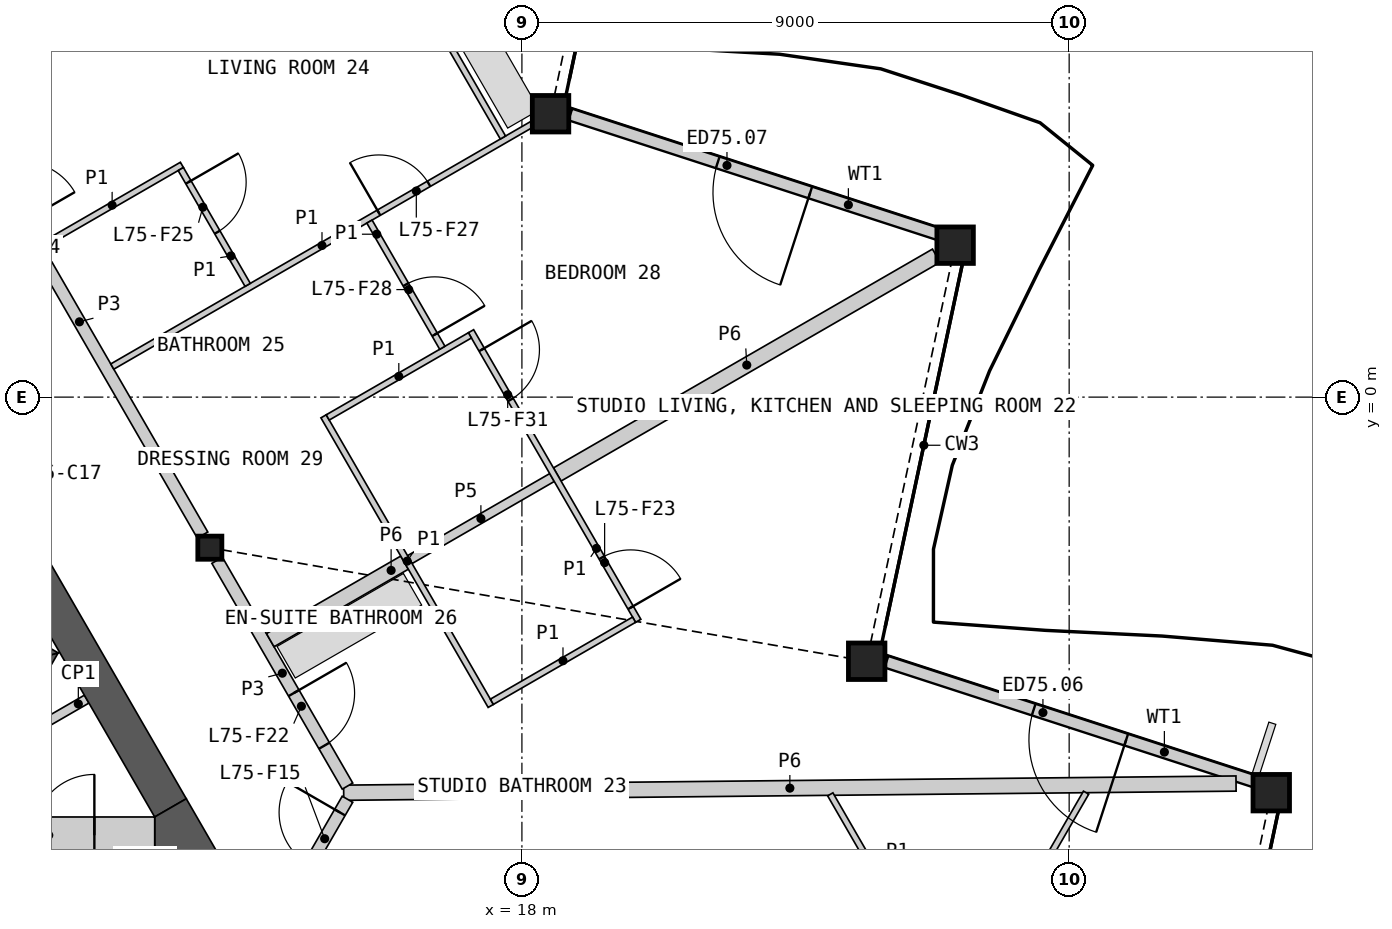
"""IFC4 building model, lengths in metres.
Left out: names, types, materials, properties, quantities, classifications, styles, units other than length and angle.
Written with IfcOpenShell. Run it as: python <this file> out.ifc"""

import sys

from ifc_helpers import new_model, si_unit, direction, frame, frame_2d, origin, origin_2d, place, context, subcontext, project, spatial, polyline, rectangle, hollow_rectangle, i_section, outline, extrude, element, fill, save


model = new_model("IFC4")
c1 = context("Model", 3, precision=1e-05, world=origin(), true_north=direction((0.0, 1.0)))
c2 = subcontext(c1, "Body", "Model", "MODEL_VIEW")
j1 = project(units=[si_unit("LENGTHUNIT", "METRE"), si_unit("PLANEANGLEUNIT", "RADIAN")], contexts=[c1])
p1 = place(None, origin())
s1 = spatial("IfcSite", under=j1, at=p1, CompositionType="ELEMENT")
p2 = place(p1, origin())
s2 = spatial("IfcBuilding", under=s1, at=p2, CompositionType="ELEMENT")
p3 = place(p2, frame((0.0, 0.0, 335.8)))
s3 = spatial("IfcBuildingStorey", under=s2, at=p3, CompositionType="ELEMENT", Elevation=335.8)
for number, where, z_axis, x_axis in (
    (1, (30.324, -6.506, 0.0), (0.0, 0.0, 1.0), (1.0, 0.0, 0.0)),
    (2, (23.67, -4.344, 0.0), (0.0, 0.0, 1.0), (1.0, 0.0, 0.0)),
    (3, (25.125, 2.499, 0.0), (0.0, 0.0, 1.0), (1.0, 0.0, 0.0)),
    (4, (18.471, 4.661, 0.0), (0.0, 0.0, 1.0), (1.0, 0.0, 0.0)),
):
    element("IfcColumn", number, at=place(p3, frame(where, z_axis=z_axis, x_axis=x_axis)), inside=s3, PredefinedType="COLUMN", context=c2, shape_type="SweptSolid", body=[
        extrude(hollow_rectangle(XDim=0.6, YDim=0.6, WallThickness=0.04, at=origin_2d()), origin(), (0.0, 0.0, 1.0), 3.4),
    ])
p4 = place(p3, frame((12.868, -2.476, 0.0), z_axis=(0.0, 0.0, 1.0), x_axis=(1.0, 0.0, 0.0)))
e5 = element("IfcColumn", 5, at=p4, inside=s3, PredefinedType="COLUMN", context=c2, shape_type="SweptSolid", body=[
    extrude(i_section(OverallWidth=0.396, OverallDepth=0.381, WebThickness=0.019, FlangeThickness=0.03, at=origin_2d()), origin(), (0.0, 0.0, 1.0), 3.4),
])
p5 = place(p3, frame((30.09, -6.333, 0.0), z_axis=(0.0, 0.0, 1.0), x_axis=(-0.951048625867, 0.309041277561, 0.0)))
e6 = element("IfcWall", 6, at=p5, inside=s3, PredefinedType="SOLIDWALL", context=c2, shape_type="SweptSolid", body=[
    extrude(rectangle(XDim=6.408, YDim=0.2, at=frame_2d((3.204, 0.0))), origin(), (0.0, 0.0, 1.0), 2.488),
])
p6 = place(p5, frame((2.262, 0.0, 0.0)))
e7 = element("IfcOpeningElement", 7, at=p6, cuts=e6, PredefinedType="OPENING", context=c2, shape_type="SweptSolid", body=[
    extrude(rectangle(XDim=1.6, YDim=2.25, at=frame_2d((0.8, 1.125))), frame((0.0, 0.11, 0.0), z_axis=(0.0, -1.0, 0.0), x_axis=(1.0, 0.0, 0.0)), (0.0, 0.0, 1.0), 0.22),
])
p7 = place(p3, frame((24.893, 2.667, 0.0), z_axis=(0.0, 0.0, 1.0), x_axis=(-0.951058691075, 0.309010301012, 0.0)))
e8 = element("IfcWall", 8, at=p7, inside=s3, PredefinedType="SOLIDWALL", context=c2, shape_type="SweptSolid", body=[
    extrude(rectangle(XDim=6.411, YDim=0.2, at=frame_2d((3.206, 0.0))), origin(), (0.0, 0.0, 1.0), 2.488),
])
p8 = place(p7, frame((2.262, 0.0, 0.0)))
e9 = element("IfcOpeningElement", 9, at=p8, cuts=e8, PredefinedType="OPENING", context=c2, shape_type="SweptSolid", body=[
    extrude(rectangle(XDim=1.6, YDim=2.25, at=frame_2d((0.8, 1.125))), frame((0.0, 0.11, 0.0), z_axis=(0.0, -1.0, 0.0), x_axis=(1.0, 0.0, 0.0)), (0.0, 0.0, 1.0), 0.22),
])
p9 = place(p3, origin())
e10 = element("IfcWall", 10, at=p9, inside=s3, PredefinedType="SHEAR", context=c2, shape_type="SweptSolid", body=[
    extrude(outline(polyline([(8.83, -6.881), (10.374, -4.206), (10.032, -4.298), (8.738, -6.539), (8.83, -6.881)])), origin(), (0.0, 0.0, 1.0), 3.1),
])
p10 = place(p3, origin())
e11 = element("IfcWall", 11, at=p10, inside=s3, PredefinedType="SHEAR", context=c2, shape_type="SweptSolid", body=[
    extrude(outline(polyline([(10.032, -4.298), (10.374, -4.206), (5.307, -1.281), (5.182, -1.498), (10.032, -4.298)])), origin(), (0.0, 0.0, 1.0), 3.1),
])
p11 = place(p3, frame((10.842, -4.967, 0.0), z_axis=(0.0, 0.0, 1.0), x_axis=(-0.866098216386, -0.499873863663, 0.0)))
e12 = element("IfcWall", 12, at=p11, inside=s3, PredefinedType="PARTITIONING", context=c2, shape_type="SweptSolid", body=[
    extrude(rectangle(XDim=1.582, YDim=0.15, at=frame_2d((0.791, 0.0))), origin(), (0.0, 0.0, 1.0), 3.1),
])
p12 = place(p3, frame((12.221, -6.756, 0.0), z_axis=(0.0, 0.0, 1.0), x_axis=(-0.500020646047, 0.866013483456, 0.0)))
e13 = element("IfcWall", 13, at=p12, inside=s3, PredefinedType="SHEAR", context=c2, shape_type="SweptSolid", body=[
    extrude(rectangle(XDim=4.559, YDim=0.6, at=frame_2d((2.28, 0.0))), origin(), (0.0, 0.0, 1.0), 3.1),
])
p13 = place(p3, origin())
e14 = element("IfcWall", 14, at=p13, inside=s3, PredefinedType="SHEAR", context=c2, shape_type="SweptSolid", body=[
    extrude(outline(polyline([(11.961, -7.506), (11.961, -6.906), (12.48, -6.606), (13.0, -7.506), (11.961, -7.506)])), origin(), (0.0, 0.0, 1.0), 3.1),
])
p14 = place(p3, frame((9.369, -7.206, 0.0), z_axis=(0.0, 0.0, 1.0), x_axis=(1.0, 0.0, 0.0)))
e15 = element("IfcWall", 15, at=p14, inside=s3, PredefinedType="SHEAR", context=c2, shape_type="SweptSolid", body=[
    extrude(rectangle(XDim=2.592, YDim=0.6, at=frame_2d((1.296, 0.0))), origin(), (0.0, 0.0, 1.0), 3.1),
])
p15 = place(p14, frame((0.6, 0.0, 0.0)))
e16 = element("IfcOpeningElement", 16, at=p15, cuts=e15, PredefinedType="OPENING", context=c2, shape_type="SweptSolid", body=[
    extrude(rectangle(XDim=1.0, YDim=2.1, at=frame_2d((0.5, 1.05))), frame((0.0, 0.31, 0.0), z_axis=(0.0, -1.0, 0.0), x_axis=(1.0, 0.0, 0.0)), (0.0, 0.0, 1.0), 0.62),
])
p16 = place(p3, frame((15.069, -6.507, 0.0), z_axis=(0.0, 0.0, 1.0), x_axis=(0.999946985532, 0.010296898856, 0.0)))
e17 = element("IfcWall", 17, at=p16, inside=s3, PredefinedType="PARTITIONING", context=c2, shape_type="SweptSolid", body=[
    extrude(rectangle(XDim=14.677, YDim=0.25, at=frame_2d((7.338, 0.0))), origin(), (0.0, 0.0, 1.0), 2.33),
])
p17 = place(p3, frame((8.698, 4.745, 0.0), z_axis=(0.0, 0.0, 1.0), x_axis=(0.499984266882, -0.866034487114, 0.0)))
e18 = element("IfcWall", 18, at=p17, inside=s3, PredefinedType="PARTITIONING", context=c2, shape_type="SweptSolid", body=[
    extrude(rectangle(XDim=8.099, YDim=0.2, at=frame_2d((4.049, 0.0))), origin(), (0.0, 0.0, 1.0), 3.1),
])
p18 = place(p17, frame((1.164, 0.0, 0.0)))
e19 = element("IfcOpeningElement", 19, at=p18, cuts=e18, PredefinedType="OPENING", context=c2, shape_type="SweptSolid", body=[
    extrude(rectangle(XDim=1.0, YDim=2.1, at=frame_2d((0.5, 1.05))), frame((0.0, 0.11, 0.0), z_axis=(0.0, -1.0, 0.0), x_axis=(1.0, 0.0, 0.0)), (0.0, 0.0, 1.0), 0.22),
])
p19 = place(p3, frame((18.581, -1.272, 0.0), z_axis=(0.0, 0.0, 1.0), x_axis=(0.866024038922, 0.500002364004, 0.0)))
e20 = element("IfcWall", 20, at=p19, inside=s3, PredefinedType="PARTITIONING", context=c2, shape_type="SweptSolid", body=[
    extrude(rectangle(XDim=7.198, YDim=0.25, at=frame_2d((3.599, 0.0))), origin(), (0.0, 0.0, 1.0), 2.33),
])
p20 = place(p3, frame((12.988, -2.684, 0.0), z_axis=(0.0, 0.0, 1.0), x_axis=(0.500003406062, -0.866023437285, 0.0)))
e21 = element("IfcWall", 21, at=p20, inside=s3, PredefinedType="PARTITIONING", context=c2, shape_type="SweptSolid", body=[
    extrude(rectangle(XDim=4.288, YDim=0.2, at=frame_2d((2.144, 0.0))), origin(), (0.0, 0.0, 1.0), 3.1),
])
p21 = place(p20, frame((2.521, 0.0, 0.0)))
e22 = element("IfcOpeningElement", 22, at=p21, cuts=e21, PredefinedType="OPENING", context=c2, shape_type="SweptSolid", body=[
    extrude(rectangle(XDim=1.0, YDim=2.1, at=frame_2d((0.5, 1.05))), frame((0.0, 0.11, 0.0), z_axis=(0.0, -1.0, 0.0), x_axis=(1.0, 0.0, 0.0)), (0.0, 0.0, 1.0), 0.22),
])
p22 = place(p3, frame((13.293, -9.797, 0.0), z_axis=(0.0, 0.0, 1.0), x_axis=(0.499967746641, 0.866044024469, 0.0)))
e23 = element("IfcWall", 23, at=p22, inside=s3, PredefinedType="PARTITIONING", context=c2, shape_type="SweptSolid", body=[
    extrude(rectangle(XDim=3.676, YDim=0.2, at=frame_2d((1.838, 0.0))), origin(), (0.0, 0.0, 1.0), 3.1),
])
p23 = place(p22, frame((2.426, 0.0, 0.0)))
e24 = element("IfcOpeningElement", 24, at=p23, cuts=e23, PredefinedType="OPENING", context=c2, shape_type="SweptSolid", body=[
    extrude(rectangle(XDim=1.0, YDim=2.1, at=frame_2d((0.5, 1.05))), frame((0.0, 0.11, 0.0), z_axis=(0.0, -1.0, 0.0), x_axis=(1.0, 0.0, 0.0)), (0.0, 0.0, 1.0), 0.22),
])
p24 = place(p3, frame((13.861, -3.997, 0.0), z_axis=(0.0, 0.0, 1.0), x_axis=(0.866030925526, 0.499990435942, 0.0)))
e25 = element("IfcWall", 25, at=p24, inside=s3, PredefinedType="PARTITIONING", context=c2, shape_type="SweptSolid", body=[
    extrude(rectangle(XDim=2.55, YDim=0.25, at=frame_2d((1.275, 0.0))), origin(), (0.0, 0.0, 1.0), 2.33),
])
p25 = place(p3, frame((16.156, -2.672, 0.0), z_axis=(0.0, 0.0, 1.0), x_axis=(0.866059108428, 0.4999416173, 0.0)))
e26 = element("IfcWall", 26, at=p25, inside=s3, PredefinedType="PLUMBINGWALL", context=c2, shape_type="SweptSolid", body=[
    extrude(rectangle(XDim=2.7, YDim=0.15, at=frame_2d((1.35, 0.0))), origin(), (0.0, 0.0, 1.0), 2.33),
])
p26 = place(p3, frame((8.786, 5.073, 0.0), z_axis=(0.0, 0.0, 1.0), x_axis=(0.86602139559, 0.500006942333, 0.0)))
e27 = element("IfcWall", 27, at=p26, inside=s3, PredefinedType="PARTITIONING", context=c2, shape_type="SweptSolid", body=[
    extrude(rectangle(XDim=12.505, YDim=0.1, at=frame_2d((6.252, 0.0))), origin(), (0.0, 0.0, 1.0), 2.33),
])
p27 = place(p26, frame((5.275, 0.0, 0.0)))
e28 = element("IfcOpeningElement", 28, at=p27, cuts=e27, PredefinedType="OPENING", context=c2, shape_type="SweptSolid", body=[
    extrude(rectangle(XDim=0.95, YDim=2.1, at=frame_2d((0.475, 1.05))), frame((0.0, 0.06, 0.0), z_axis=(0.0, -1.0, 0.0), x_axis=(1.0, 0.0, 0.0)), (0.0, 0.0, 1.0), 0.12),
])
p28 = place(p3, frame((11.263, 0.503, 0.0), z_axis=(0.0, 0.0, 1.0), x_axis=(0.866023773276, 0.500002824113, 0.0)))
e29 = element("IfcWall", 29, at=p28, inside=s3, PredefinedType="PARTITIONING", context=c2, shape_type="SweptSolid", body=[
    extrude(rectangle(XDim=7.965, YDim=0.1, at=frame_2d((3.982, 0.0))), origin(), (0.0, 0.0, 1.0), 2.33),
])
p29 = place(p28, frame((5.061, 0.0, 0.0)))
e30 = element("IfcOpeningElement", 30, at=p29, cuts=e29, PredefinedType="OPENING", context=c2, shape_type="SweptSolid", body=[
    extrude(rectangle(XDim=0.95, YDim=2.1, at=frame_2d((0.475, 1.05))), frame((0.0, 0.06, 0.0), z_axis=(0.0, -1.0, 0.0), x_axis=(1.0, 0.0, 0.0)), (0.0, 0.0, 1.0), 0.12),
])
p30 = place(p3, frame((23.301, -13.395, 0.0), z_axis=(0.0, 0.0, 1.0), x_axis=(0.500017325895, 0.866015400443, 0.0)))
e31 = element("IfcWall", 31, at=p30, inside=s3, PredefinedType="PARTITIONING", context=c2, shape_type="SweptSolid", body=[
    extrude(rectangle(XDim=7.955, YDim=0.1, at=frame_2d((3.978, 0.0))), origin(), (0.0, 0.0, 1.0), 2.33),
])
p31 = place(p30, frame((1.951, 0.0, 0.0)))
e32 = element("IfcOpeningElement", 32, at=p31, cuts=e31, PredefinedType="OPENING", context=c2, shape_type="SweptSolid", body=[
    extrude(rectangle(XDim=0.95, YDim=2.1, at=frame_2d((0.475, 1.05))), frame((0.0, 0.06, 0.0), z_axis=(0.0, -1.0, 0.0), x_axis=(1.0, 0.0, 0.0)), (0.0, 0.0, 1.0), 0.12),
])
p32 = place(p3, frame((14.738, -0.316, 0.0), z_axis=(0.0, 0.0, 1.0), x_axis=(0.499996545922, -0.866027397988, 0.0)))
e33 = element("IfcWall", 33, at=p32, inside=s3, PredefinedType="PARTITIONING", context=c2, shape_type="SweptSolid", body=[
    extrude(rectangle(XDim=5.5, YDim=0.1, at=frame_2d((2.75, 0.0))), origin(), (0.0, 0.0, 1.0), 2.33),
])
p33 = place(p3, frame((17.163, 1.084, 0.0), z_axis=(0.0, 0.0, 1.0), x_axis=(0.500015767406, -0.866016300277, 0.0)))
e34 = element("IfcWall", 34, at=p33, inside=s3, PredefinedType="PARTITIONING", context=c2, shape_type="SweptSolid", body=[
    extrude(rectangle(XDim=5.5, YDim=0.1, at=frame_2d((2.75, 0.0))), origin(), (0.0, 0.0, 1.0), 2.33),
])
p34 = place(p33, frame((4.3, 0.0, 0.0)))
e35 = element("IfcOpeningElement", 35, at=p34, cuts=e34, PredefinedType="OPENING", context=c2, shape_type="SweptSolid", body=[
    extrude(rectangle(XDim=0.95, YDim=2.1, at=frame_2d((0.475, 1.05))), frame((0.0, 0.06, 0.0), z_axis=(0.0, -1.0, 0.0), x_axis=(1.0, 0.0, 0.0)), (0.0, 0.0, 1.0), 0.12),
])
p35 = place(p33, frame((0.351, 0.0, 0.0)))
e36 = element("IfcOpeningElement", 36, at=p35, cuts=e34, PredefinedType="OPENING", context=c2, shape_type="SweptSolid", body=[
    extrude(rectangle(XDim=0.95, YDim=2.1, at=frame_2d((0.475, 1.05))), frame((0.0, 0.06, 0.0), z_axis=(0.0, -1.0, 0.0), x_axis=(1.0, 0.0, 0.0)), (0.0, 0.0, 1.0), 0.12),
])
p36 = place(p3, frame((15.14, 8.683, 0.0), z_axis=(0.0, 0.0, 1.0), x_axis=(0.499987849973, -0.866032418492, 0.0)))
e37 = element("IfcWall", 37, at=p36, inside=s3, PredefinedType="PARTITIONING", context=c2, shape_type="SweptSolid", body=[
    extrude(rectangle(XDim=5.096, YDim=0.1, at=frame_2d((2.548, 0.0))), origin(), (0.0, 0.0, 1.0), 2.33),
])
p37 = place(p36, frame((0.554, 0.0, 0.0)))
e38 = element("IfcOpeningElement", 38, at=p37, cuts=e37, PredefinedType="OPENING", context=c2, shape_type="SweptSolid", body=[
    extrude(rectangle(XDim=0.95, YDim=2.1, at=frame_2d((0.475, 1.05))), frame((0.0, 0.06, 0.0), z_axis=(0.0, -1.0, 0.0), x_axis=(1.0, 0.0, 0.0)), (0.0, 0.0, 1.0), 0.12),
])
p38 = place(p3, frame((23.072, -6.533, 0.0), z_axis=(0.0, 0.0, 1.0), x_axis=(0.500009026289, -0.866020192391, 0.0)))
e39 = element("IfcWall", 39, at=p38, inside=s3, PredefinedType="PARTITIONING", context=c2, shape_type="SweptSolid", body=[
    extrude(rectangle(XDim=2.999, YDim=0.1, at=frame_2d((1.5, 0.0))), origin(), (0.0, 0.0, 1.0), 2.33),
])
for number, where, z_axis, x_axis in (
    (40, (17.506, -5.011, 0.0), (0.0, 0.0, 1.0), (0.866, 0.5, 0.0)),
    (41, (14.806, -0.334, 0.0), (0.0, 0.0, 1.0), (0.866, 0.5, 0.0)),
):
    element("IfcWall", number, at=place(p3, frame(where, z_axis=z_axis, x_axis=x_axis)), inside=s3, PredefinedType="PARTITIONING", context=c2, shape_type="SweptSolid", body=[
        extrude(rectangle(XDim=2.7, YDim=0.1, at=frame_2d((1.35, 0.0))), origin(), (0.0, 0.0, 1.0), 2.33),
    ])
p39 = place(p3, frame((10.113, 2.494, 0.0), z_axis=(0.0, 0.0, 1.0), x_axis=(0.865989200783, 0.500062700197, 0.0)))
e42 = element("IfcWall", 42, at=p39, inside=s3, PredefinedType="PARTITIONING", context=c2, shape_type="SweptSolid", body=[
    extrude(rectangle(XDim=2.65, YDim=0.1, at=frame_2d((1.325, 0.0))), origin(), (0.0, 0.0, 1.0), 2.33),
])
p40 = place(p3, frame((15.493, 2.887, 0.0), z_axis=(0.0, 0.0, 1.0), x_axis=(0.499963527173, -0.866046460357, 0.0)))
e43 = element("IfcWall", 43, at=p40, inside=s3, PredefinedType="PARTITIONING", context=c2, shape_type="SweptSolid", body=[
    extrude(rectangle(XDim=2.396, YDim=0.1, at=frame_2d((1.198, 0.0))), origin(), (0.0, 0.0, 1.0), 2.33),
])
p41 = place(p40, frame((1.196, 0.0, 0.0)))
e44 = element("IfcOpeningElement", 44, at=p41, cuts=e43, PredefinedType="OPENING", context=c2, shape_type="SweptSolid", body=[
    extrude(rectangle(XDim=0.95, YDim=2.1, at=frame_2d((0.475, 1.05))), frame((0.0, 0.06, 0.0), z_axis=(0.0, -1.0, 0.0), x_axis=(1.0, 0.0, 0.0)), (0.0, 0.0, 1.0), 0.12),
])
p42 = place(p3, frame((12.39, 3.751, 0.0), z_axis=(0.0, 0.0, 1.0), x_axis=(0.50002983664, -0.866008176907, 0.0)))
e45 = element("IfcWall", 45, at=p42, inside=s3, PredefinedType="PARTITIONING", context=c2, shape_type="SweptSolid", body=[
    extrude(rectangle(XDim=2.2, YDim=0.1, at=frame_2d((1.1, 0.0))), origin(), (0.0, 0.0, 1.0), 2.33),
])
p43 = place(p42, frame((0.25, 0.0, 0.0)))
e46 = element("IfcOpeningElement", 46, at=p43, cuts=e45, PredefinedType="OPENING", context=c2, shape_type="SweptSolid", body=[
    extrude(rectangle(XDim=0.95, YDim=2.1, at=frame_2d((0.475, 1.05))), frame((0.0, 0.06, 0.0), z_axis=(0.0, -1.0, 0.0), x_axis=(1.0, 0.0, 0.0)), (0.0, 0.0, 1.0), 0.12),
])
p44 = place(p6, origin())
e47 = element("IfcDoor", 47, at=p44, inside=s3, OperationType="DOUBLE_DOOR_SINGLE_SWING", PredefinedType="DOOR", context=c2, shape_type="SweptSolid", body=[
    extrude(rectangle(XDim=1.6, YDim=2.25, at=frame_2d((0.8, 1.125))), frame((0.0, 0.025, 0.0), z_axis=(0.0, -1.0, 0.0), x_axis=(1.0, 0.0, 0.0)), (0.0, 0.0, 1.0), 0.05),
])
fill(e7, e47)
p45 = place(p8, origin())
e48 = element("IfcDoor", 48, at=p45, inside=s3, OperationType="DOUBLE_DOOR_SINGLE_SWING", PredefinedType="DOOR", context=c2, shape_type="SweptSolid", body=[
    extrude(rectangle(XDim=1.6, YDim=2.25, at=frame_2d((0.8, 1.125))), frame((0.0, 0.025, 0.0), z_axis=(0.0, -1.0, 0.0), x_axis=(1.0, 0.0, 0.0)), (0.0, 0.0, 1.0), 0.05),
])
fill(e9, e48)
p46 = place(p15, origin())
e49 = element("IfcDoor", 49, at=p46, inside=s3, OperationType="SINGLE_SWING_RIGHT", PredefinedType="DOOR", context=c2, shape_type="SweptSolid", body=[
    extrude(rectangle(XDim=1.0, YDim=2.1, at=frame_2d((0.5, 1.05))), frame((0.0, 0.055, 0.0), z_axis=(0.0, -1.0, 0.0), x_axis=(1.0, 0.0, 0.0)), (0.0, 0.0, 1.0), 0.05),
])
fill(e16, e49)
p47 = place(p23, origin())
e50 = element("IfcDoor", 50, at=p47, inside=s3, OperationType="SINGLE_SWING_RIGHT", PredefinedType="DOOR", context=c2, shape_type="SweptSolid", body=[
    extrude(rectangle(XDim=1.0, YDim=2.1, at=frame_2d((0.5, 1.05))), frame((0.0, 0.025, 0.0), z_axis=(0.0, -1.0, 0.0), x_axis=(1.0, 0.0, 0.0)), (0.0, 0.0, 1.0), 0.05),
])
fill(e24, e50)
p48 = place(p21, origin())
e51 = element("IfcDoor", 51, at=p48, inside=s3, OperationType="SINGLE_SWING_LEFT", PredefinedType="DOOR", context=c2, shape_type="SweptSolid", body=[
    extrude(rectangle(XDim=1.0, YDim=2.1, at=frame_2d((0.5, 1.05))), frame((0.0, 0.025, 0.0), z_axis=(0.0, -1.0, 0.0), x_axis=(1.0, 0.0, 0.0)), (0.0, 0.0, 1.0), 0.05),
])
fill(e22, e51)
p49 = place(p34, origin())
e52 = element("IfcDoor", 52, at=p49, inside=s3, OperationType="SINGLE_SWING_RIGHT", PredefinedType="DOOR", context=c2, shape_type="SweptSolid", body=[
    extrude(rectangle(XDim=0.95, YDim=2.1, at=frame_2d((0.475, 1.05))), frame((0.0, 0.025, 0.0), z_axis=(0.0, -1.0, 0.0), x_axis=(1.0, 0.0, 0.0)), (0.0, 0.0, 1.0), 0.05),
])
fill(e35, e52)
p50 = place(p43, origin())
e53 = element("IfcDoor", 53, at=p50, inside=s3, OperationType="SINGLE_SWING_LEFT", PredefinedType="DOOR", context=c2, shape_type="SweptSolid", body=[
    extrude(rectangle(XDim=0.95, YDim=2.1, at=frame_2d((0.475, 1.05))), frame((0.0, 0.025, 0.0), z_axis=(0.0, -1.0, 0.0), x_axis=(1.0, 0.0, 0.0)), (0.0, 0.0, 1.0), 0.05),
])
fill(e46, e53)
p51 = place(p29, origin())
e54 = element("IfcDoor", 54, at=p51, inside=s3, OperationType="SINGLE_SWING_LEFT", PredefinedType="DOOR", context=c2, shape_type="SweptSolid", body=[
    extrude(rectangle(XDim=0.95, YDim=2.1, at=frame_2d((0.475, 1.05))), frame((0.0, 0.025, 0.0), z_axis=(0.0, -1.0, 0.0), x_axis=(1.0, 0.0, 0.0)), (0.0, 0.0, 1.0), 0.05),
])
fill(e30, e54)
p52 = place(p41, origin())
e55 = element("IfcDoor", 55, at=p52, inside=s3, OperationType="SINGLE_SWING_RIGHT", PredefinedType="DOOR", context=c2, shape_type="SweptSolid", body=[
    extrude(rectangle(XDim=0.95, YDim=2.1, at=frame_2d((0.475, 1.05))), frame((0.0, 0.025, 0.0), z_axis=(0.0, -1.0, 0.0), x_axis=(1.0, 0.0, 0.0)), (0.0, 0.0, 1.0), 0.05),
])
fill(e44, e55)
p53 = place(p35, origin())
e56 = element("IfcDoor", 56, at=p53, inside=s3, OperationType="SINGLE_SWING_LEFT", PredefinedType="DOOR", context=c2, shape_type="SweptSolid", body=[
    extrude(rectangle(XDim=0.95, YDim=2.1, at=frame_2d((0.475, 1.05))), frame((0.0, 0.025, 0.0), z_axis=(0.0, -1.0, 0.0), x_axis=(1.0, 0.0, 0.0)), (0.0, 0.0, 1.0), 0.05),
])
fill(e36, e56)
save(model, sys.argv[1])
